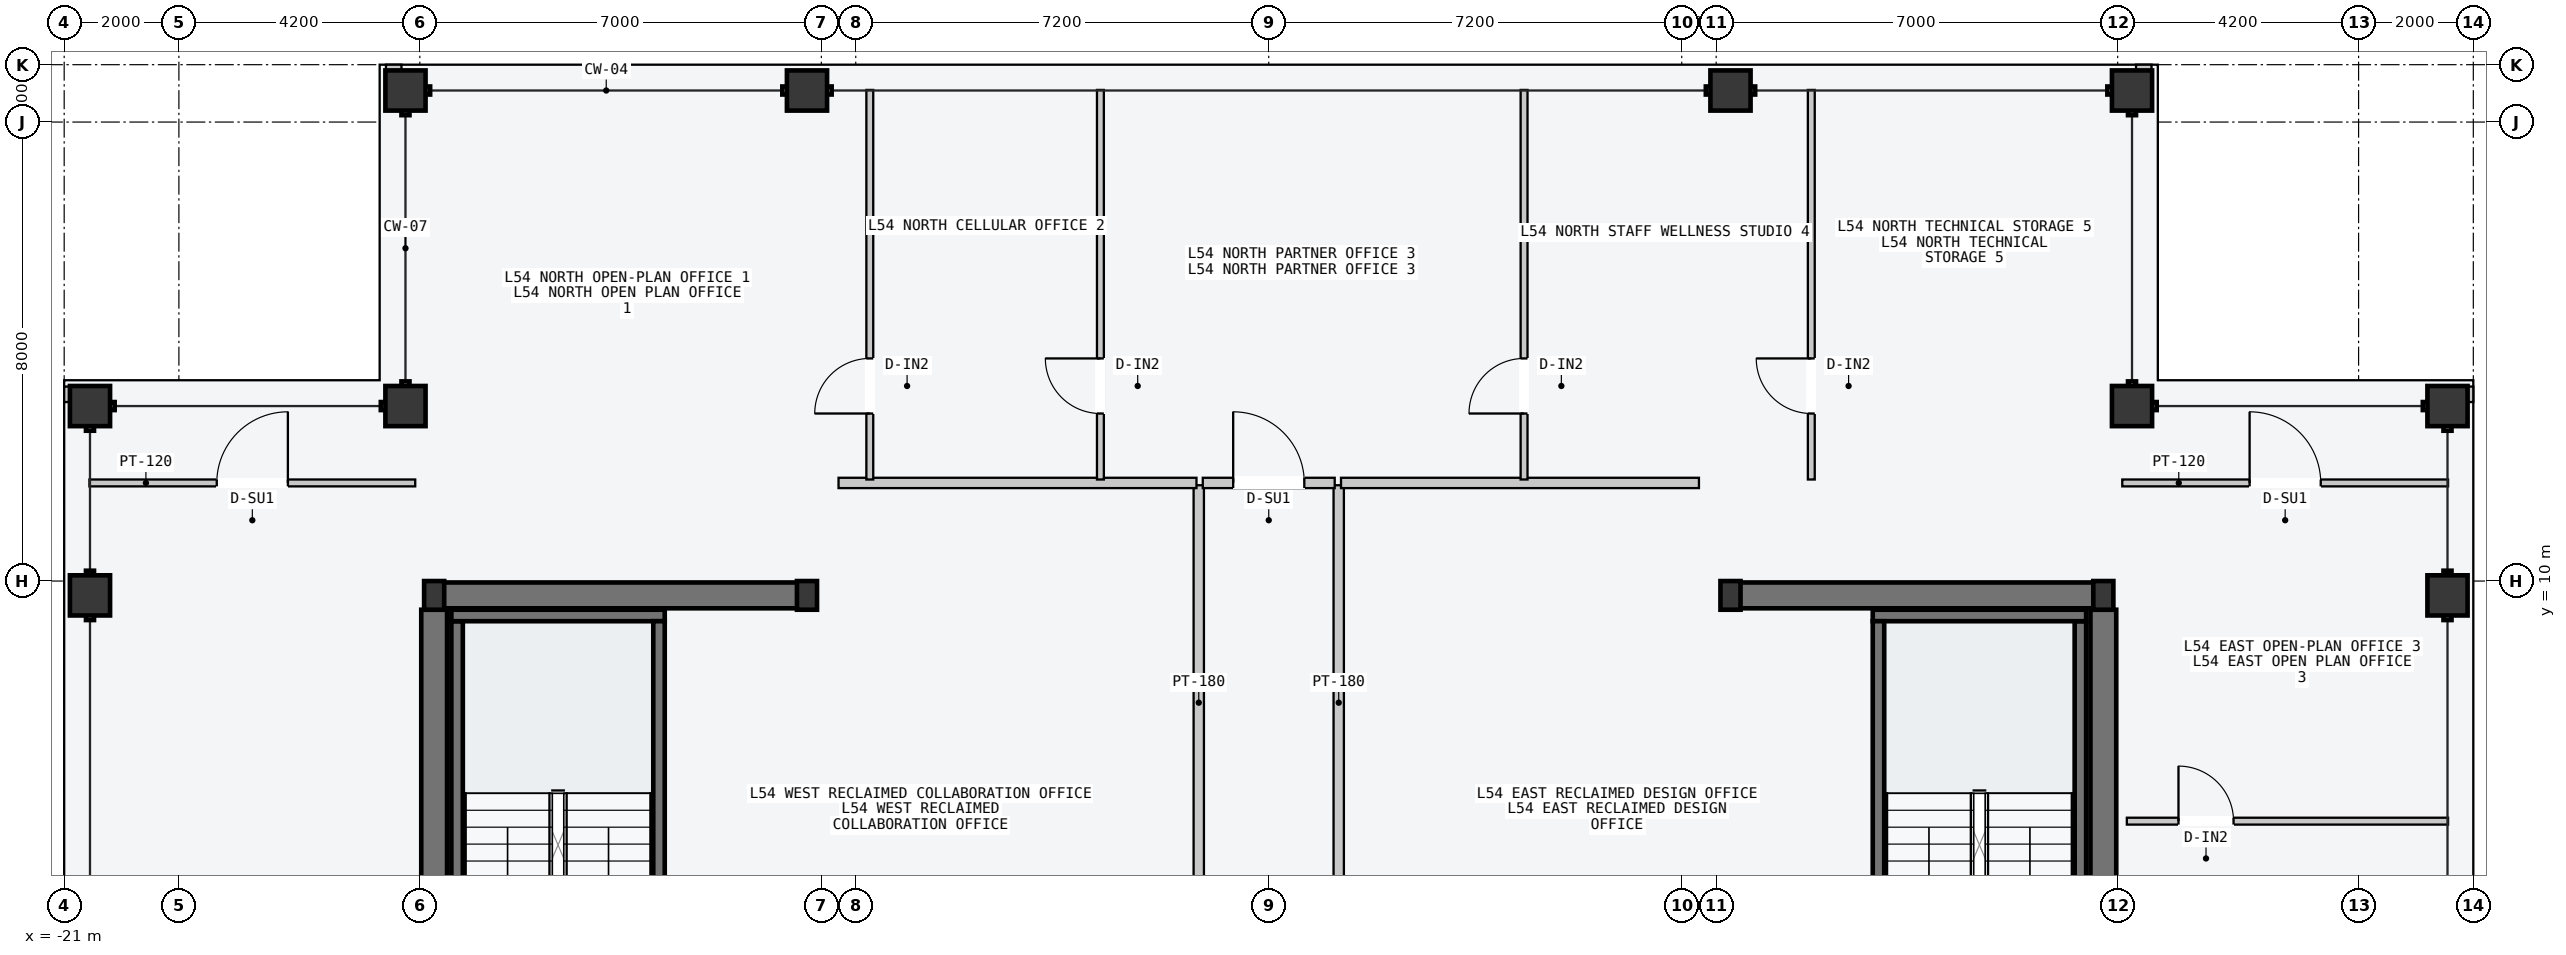
"""IFC4 building model, lengths in metres.
Left out: names, types, materials, properties, quantities, classifications, styles, units other than length and angle.
Written with IfcOpenShell. Run it as: python <this file> out.ifc"""

import sys

from ifc_helpers import new_model, si_unit, direction, frame, frame_2d, origin, origin_2d, place, context, subcontext, project, spatial, rectangle, hollow_rectangle, i_section, extrude, element, fill, save


model = new_model("IFC4")
c1 = context("Model", 3, precision=1e-05, world=origin(), true_north=direction((0.0, 1.0)))
c2 = subcontext(c1, "Body", "Model", "MODEL_VIEW")
j1 = project(units=[si_unit("LENGTHUNIT", "METRE"), si_unit("PLANEANGLEUNIT", "RADIAN")], contexts=[c1])
p1 = place(None, origin())
s1 = spatial("IfcSite", under=j1, at=p1, CompositionType="ELEMENT")
p2 = place(p1, origin())
s2 = spatial("IfcBuilding", under=s1, at=p2, CompositionType="ELEMENT")
p3 = place(p2, frame((0.0, 0.0, 205.5)))
s3 = spatial("IfcBuildingStorey", under=s2, at=p3, CompositionType="ELEMENT", Elevation=205.5)
p4 = place(p3, frame((-14.53, 9.75, -0.2), z_axis=(0.0, 0.0, 1.0), x_axis=(1.0, 0.0, 0.0)))
e1 = element("IfcWall", 1, at=p4, inside=s3, PredefinedType="SHEAR", context=c2, shape_type="SweptSolid", body=[
    extrude(rectangle(XDim=6.46, YDim=0.45, at=frame_2d((3.23, 0.0))), origin(), (0.0, 0.0, 1.0), 3.6),
])
p5 = place(p3, frame((-14.55, 0.25, -0.2), z_axis=(0.0, 0.0, 1.0), x_axis=(0.0, 1.0, 0.0)))
e2 = element("IfcWall", 2, at=p5, inside=s3, PredefinedType="SHEAR", context=c2, shape_type="SweptSolid", body=[
    extrude(rectangle(XDim=9.25, YDim=0.45, at=frame_2d((4.625, 0.0))), origin(), (0.0, 0.0, 1.0), 3.6),
])
p6 = place(p3, frame((8.07, 9.75, -0.2), z_axis=(0.0, 0.0, 1.0), x_axis=(1.0, 0.0, 0.0)))
e3 = element("IfcWall", 3, at=p6, inside=s3, PredefinedType="SHEAR", context=c2, shape_type="SweptSolid", body=[
    extrude(rectangle(XDim=6.46, YDim=0.45, at=frame_2d((3.23, 0.0))), origin(), (0.0, 0.0, 1.0), 3.6),
])
p7 = place(p3, frame((14.55, 0.25, -0.2), z_axis=(0.0, 0.0, 1.0), x_axis=(0.0, 1.0, 0.0)))
e4 = element("IfcWall", 4, at=p7, inside=s3, PredefinedType="SHEAR", context=c2, shape_type="SweptSolid", body=[
    extrude(rectangle(XDim=9.25, YDim=0.45, at=frame_2d((4.625, 0.0))), origin(), (0.0, 0.0, 1.0), 3.6),
])
for number, where, z_axis, x_axis in (
    (5, (-14.15, 1.5, -0.2), (0.0, 0.0, 1.0), (0.0, 1.0, 0.0)),
    (6, (14.15, 1.5, -0.2), (0.0, 0.0, 1.0), (0.0, 1.0, 0.0)),
):
    element("IfcWall", number, at=place(p3, frame(where, z_axis=z_axis, x_axis=x_axis)), inside=s3, PredefinedType="SOLIDWALL", context=c2, shape_type="SweptSolid", body=[
        extrude(rectangle(XDim=7.8, YDim=0.2, at=frame_2d((3.9, 0.0))), origin(), (0.0, 0.0, 1.0), 3.6),
    ])
p8 = place(p3, frame((-14.25, 9.4, -0.2), z_axis=(0.0, 0.0, 1.0), x_axis=(1.0, 0.0, 0.0)))
e7 = element("IfcWall", 7, at=p8, inside=s3, PredefinedType="SOLIDWALL", context=c2, shape_type="SweptSolid", body=[
    extrude(rectangle(XDim=3.72, YDim=0.2, at=frame_2d((1.86, 0.0))), origin(), (0.0, 0.0, 1.0), 3.6),
])
p9 = place(p3, frame((-10.63, 1.5, -0.2), z_axis=(0.0, 0.0, 1.0), x_axis=(0.0, 1.0, 0.0)))
e8 = element("IfcWall", 8, at=p9, inside=s3, PredefinedType="SOLIDWALL", context=c2, shape_type="SweptSolid", body=[
    extrude(rectangle(XDim=7.8, YDim=0.2, at=frame_2d((3.9, 0.0))), origin(), (0.0, 0.0, 1.0), 3.6),
])
p10 = place(p3, frame((10.53, 9.4, -0.2), z_axis=(0.0, 0.0, 1.0), x_axis=(1.0, 0.0, 0.0)))
e9 = element("IfcWall", 9, at=p10, inside=s3, PredefinedType="SOLIDWALL", context=c2, shape_type="SweptSolid", body=[
    extrude(rectangle(XDim=3.72, YDim=0.2, at=frame_2d((1.86, 0.0))), origin(), (0.0, 0.0, 1.0), 3.6),
])
p11 = place(p3, frame((10.63, 1.5, -0.2), z_axis=(0.0, 0.0, 1.0), x_axis=(0.0, 1.0, 0.0)))
e10 = element("IfcWall", 10, at=p11, inside=s3, PredefinedType="SOLIDWALL", context=c2, shape_type="SweptSolid", body=[
    extrude(rectangle(XDim=7.8, YDim=0.2, at=frame_2d((3.9, 0.0))), origin(), (0.0, 0.0, 1.0), 3.6),
])
for number, where, z_axis, x_axis in (
    (11, (-14.55, 9.75, 0.0), (0.0, 0.0, 1.0), (1.0, 0.0, 0.0)),
    (12, (-8.05, 9.75, 0.0), (0.0, 0.0, 1.0), (1.0, 0.0, 0.0)),
    (13, (8.05, 9.75, 0.0), (0.0, 0.0, 1.0), (1.0, 0.0, 0.0)),
    (14, (14.55, 9.75, 0.0), (0.0, 0.0, 1.0), (1.0, 0.0, 0.0)),
):
    element("IfcColumn", number, at=place(p3, frame(where, z_axis=z_axis, x_axis=x_axis)), inside=s3, PredefinedType="COLUMN", context=c2, shape_type="SweptSolid", body=[
        extrude(i_section(OverallWidth=0.35, OverallDepth=0.5, WebThickness=0.02, FlangeThickness=0.032, at=origin_2d()), origin(), (0.0, 0.0, 1.0), 3.6),
    ])
for number, where, z_axis, x_axis in (
    (15, (-15.05, 18.55, 0.0), (0.0, 0.0, 1.0), (1.0, 0.0, 0.0)),
    (16, (-8.05, 18.55, 0.0), (0.0, 0.0, 1.0), (1.0, 0.0, 0.0)),
    (17, (8.05, 18.55, 0.0), (0.0, 0.0, 1.0), (1.0, 0.0, 0.0)),
    (18, (15.05, 18.55, 0.0), (0.0, 0.0, 1.0), (1.0, 0.0, 0.0)),
    (19, (-20.55, 9.75, 0.0), (0.0, 0.0, 1.0), (0.0, 1.0, 0.0)),
    (20, (-20.55, 13.05, 0.0), (0.0, 0.0, 1.0), (0.0, 1.0, 0.0)),
    (21, (20.55, 9.75, 0.0), (0.0, 0.0, 1.0), (0.0, 1.0, 0.0)),
    (22, (20.55, 13.05, 0.0), (0.0, 0.0, 1.0), (0.0, 1.0, 0.0)),
    (23, (-15.05, 13.05, 0.0), (0.0, 0.0, 1.0), (1.0, 0.0, 0.0)),
    (24, (15.05, 13.05, 0.0), (0.0, 0.0, 1.0), (1.0, 0.0, 0.0)),
):
    element("IfcColumn", number, at=place(p3, frame(where, z_axis=z_axis, x_axis=x_axis)), inside=s3, PredefinedType="COLUMN", context=c2, shape_type="SweptSolid", body=[
        extrude(hollow_rectangle(XDim=0.7, YDim=0.7, WallThickness=0.03, at=origin_2d()), origin(), (0.0, 0.0, 1.0), 3.6),
    ])
for number, where, z_axis, x_axis in (
    (25, (-15.39, 18.89, 0.0), (0.0, 0.0, 1.0), (1.0, 0.0, 0.0)),
    (26, (-20.89, 13.12, 0.0), (0.0, 0.0, 1.0), (0.0, 1.0, 0.0)),
    (27, (15.12, 18.89, 0.0), (0.0, 0.0, 1.0), (1.0, 0.0, 0.0)),
    (28, (20.89, 13.12, 0.0), (0.0, 0.0, 1.0), (0.0, 1.0, 0.0)),
):
    element("IfcWall", number, at=place(p3, frame(where, z_axis=z_axis, x_axis=x_axis)), inside=s3, PredefinedType="PARAPET", context=c2, shape_type="SweptSolid", body=[
        extrude(rectangle(XDim=0.27, YDim=0.22, at=frame_2d((0.135, 0.0))), origin(), (0.0, 0.0, 1.0), 1.2),
    ])
p12 = place(p3, frame((-1.22, -3.5, 0.0), z_axis=(0.0, 0.0, 1.0), x_axis=(0.0, 1.0, 0.0)))
e29 = element("IfcWall", 29, at=p12, inside=s3, PredefinedType="PARTITIONING", context=c2, shape_type="SweptSolid", body=[
    extrude(rectangle(XDim=15.17, YDim=0.18, at=frame_2d((7.585, 0.0))), origin(), (0.0, 0.0, 1.0), 3.4),
])
p13 = place(p12, frame((6.1, 0.0, 0.0)))
e30 = element("IfcOpeningElement", 30, at=p13, cuts=e29, PredefinedType="OPENING", context=c2, shape_type="SweptSolid", body=[
    extrude(rectangle(XDim=1.24, YDim=2.24, at=frame_2d((0.62, 1.12))), frame((0.0, 0.1, 0.0), z_axis=(0.0, -1.0, 0.0), x_axis=(1.0, 0.0, 0.0)), (0.0, 0.0, 1.0), 0.2),
])
p14 = place(p12, frame((1.6, 0.0, 0.0)))
e31 = element("IfcOpeningElement", 31, at=p14, cuts=e29, PredefinedType="OPENING", context=c2, shape_type="SweptSolid", body=[
    extrude(rectangle(XDim=0.96, YDim=2.18, at=frame_2d((0.48, 1.09))), frame((0.0, 0.1, 0.0), z_axis=(0.0, -1.0, 0.0), x_axis=(1.0, 0.0, 0.0)), (0.0, 0.0, 1.0), 0.2),
])
p15 = place(p3, frame((-7.5, 11.71, 0.0), z_axis=(0.0, 0.0, 1.0), x_axis=(1.0, 0.0, 0.0)))
e32 = element("IfcWall", 32, at=p15, inside=s3, PredefinedType="PARTITIONING", context=c2, shape_type="SweptSolid", body=[
    extrude(rectangle(XDim=6.24, YDim=0.18, at=frame_2d((3.12, 0.0))), origin(), (0.0, 0.0, 1.0), 3.4),
])
p16 = place(p3, frame((1.22, -3.5, 0.0), z_axis=(0.0, 0.0, 1.0), x_axis=(0.0, 1.0, 0.0)))
e33 = element("IfcWall", 33, at=p16, inside=s3, PredefinedType="PARTITIONING", context=c2, shape_type="SweptSolid", body=[
    extrude(rectangle(XDim=15.17, YDim=0.18, at=frame_2d((7.585, 0.0))), origin(), (0.0, 0.0, 1.0), 3.4),
])
p17 = place(p16, frame((6.1, 0.0, 0.0)))
e34 = element("IfcOpeningElement", 34, at=p17, cuts=e33, PredefinedType="OPENING", context=c2, shape_type="SweptSolid", body=[
    extrude(rectangle(XDim=1.24, YDim=2.24, at=frame_2d((0.62, 1.12))), frame((0.0, 0.1, 0.0), z_axis=(0.0, -1.0, 0.0), x_axis=(1.0, 0.0, 0.0)), (0.0, 0.0, 1.0), 0.2),
])
p18 = place(p16, frame((1.6, 0.0, 0.0)))
e35 = element("IfcOpeningElement", 35, at=p18, cuts=e33, PredefinedType="OPENING", context=c2, shape_type="SweptSolid", body=[
    extrude(rectangle(XDim=0.96, YDim=2.18, at=frame_2d((0.48, 1.09))), frame((0.0, 0.1, 0.0), z_axis=(0.0, -1.0, 0.0), x_axis=(1.0, 0.0, 0.0)), (0.0, 0.0, 1.0), 0.2),
])
p19 = place(p3, frame((1.26, 11.71, 0.0), z_axis=(0.0, 0.0, 1.0), x_axis=(1.0, 0.0, 0.0)))
e36 = element("IfcWall", 36, at=p19, inside=s3, PredefinedType="PARTITIONING", context=c2, shape_type="SweptSolid", body=[
    extrude(rectangle(XDim=6.24, YDim=0.18, at=frame_2d((3.12, 0.0))), origin(), (0.0, 0.0, 1.0), 3.4),
])
p20 = place(p3, frame((-6.955, 11.77, 0.0), z_axis=(0.0, 0.0, 1.0), x_axis=(0.0, 1.0, 0.0)))
e37 = element("IfcWall", 37, at=p20, inside=s3, PredefinedType="PARTITIONING", context=c2, shape_type="SweptSolid", body=[
    extrude(rectangle(XDim=6.79, YDim=0.12, at=frame_2d((3.395, 0.0))), origin(), (0.0, 0.0, 1.0), 3.4),
])
p21 = place(p20, frame((1.15, 0.0, 0.0)))
e38 = element("IfcOpeningElement", 38, at=p21, cuts=e37, PredefinedType="OPENING", context=c2, shape_type="SweptSolid", body=[
    extrude(rectangle(XDim=0.96, YDim=2.18, at=frame_2d((0.48, 1.09))), frame((0.0, 0.07, 0.0), z_axis=(0.0, -1.0, 0.0), x_axis=(1.0, 0.0, 0.0)), (0.0, 0.0, 1.0), 0.14),
])
p22 = place(p3, frame((-2.935, 11.77, 0.0), z_axis=(0.0, 0.0, 1.0), x_axis=(0.0, 1.0, 0.0)))
e39 = element("IfcWall", 39, at=p22, inside=s3, PredefinedType="PARTITIONING", context=c2, shape_type="SweptSolid", body=[
    extrude(rectangle(XDim=6.79, YDim=0.12, at=frame_2d((3.395, 0.0))), origin(), (0.0, 0.0, 1.0), 3.4),
])
p23 = place(p22, frame((1.15, 0.0, 0.0)))
e40 = element("IfcOpeningElement", 40, at=p23, cuts=e39, PredefinedType="OPENING", context=c2, shape_type="SweptSolid", body=[
    extrude(rectangle(XDim=0.96, YDim=2.18, at=frame_2d((0.48, 1.09))), frame((0.0, 0.07, 0.0), z_axis=(0.0, -1.0, 0.0), x_axis=(1.0, 0.0, 0.0)), (0.0, 0.0, 1.0), 0.14),
])
p24 = place(p3, frame((4.451, 11.77, 0.0), z_axis=(0.0, 0.0, 1.0), x_axis=(0.0, 1.0, 0.0)))
e41 = element("IfcWall", 41, at=p24, inside=s3, PredefinedType="PARTITIONING", context=c2, shape_type="SweptSolid", body=[
    extrude(rectangle(XDim=6.79, YDim=0.12, at=frame_2d((3.395, 0.0))), origin(), (0.0, 0.0, 1.0), 3.4),
])
p25 = place(p24, frame((1.15, 0.0, 0.0)))
e42 = element("IfcOpeningElement", 42, at=p25, cuts=e41, PredefinedType="OPENING", context=c2, shape_type="SweptSolid", body=[
    extrude(rectangle(XDim=0.96, YDim=2.18, at=frame_2d((0.48, 1.09))), frame((0.0, 0.07, 0.0), z_axis=(0.0, -1.0, 0.0), x_axis=(1.0, 0.0, 0.0)), (0.0, 0.0, 1.0), 0.14),
])
p26 = place(p3, frame((9.459, 11.77, 0.0), z_axis=(0.0, 0.0, 1.0), x_axis=(0.0, 1.0, 0.0)))
e43 = element("IfcWall", 43, at=p26, inside=s3, PredefinedType="PARTITIONING", context=c2, shape_type="SweptSolid", body=[
    extrude(rectangle(XDim=6.79, YDim=0.12, at=frame_2d((3.395, 0.0))), origin(), (0.0, 0.0, 1.0), 3.4),
])
p27 = place(p26, frame((1.15, 0.0, 0.0)))
e44 = element("IfcOpeningElement", 44, at=p27, cuts=e43, PredefinedType="OPENING", context=c2, shape_type="SweptSolid", body=[
    extrude(rectangle(XDim=0.96, YDim=2.18, at=frame_2d((0.48, 1.09))), frame((0.0, 0.07, 0.0), z_axis=(0.0, -1.0, 0.0), x_axis=(1.0, 0.0, 0.0)), (0.0, 0.0, 1.0), 0.14),
])
p28 = place(p3, frame((-1.15, 11.71, 0.0), z_axis=(0.0, 0.0, 1.0), x_axis=(1.0, 0.0, 0.0)))
e45 = element("IfcWall", 45, at=p28, inside=s3, PredefinedType="PARTITIONING", context=c2, shape_type="SweptSolid", body=[
    extrude(rectangle(XDim=2.3, YDim=0.18, at=frame_2d((1.15, 0.0))), origin(), (0.0, 0.0, 1.0), 3.4),
])
p29 = place(p28, frame((0.53, 0.0, 0.0)))
e46 = element("IfcOpeningElement", 46, at=p29, cuts=e45, PredefinedType="OPENING", context=c2, shape_type="SweptSolid", body=[
    extrude(rectangle(XDim=1.24, YDim=2.24, at=frame_2d((0.62, 1.12))), frame((0.0, 0.1, 0.0), z_axis=(0.0, -1.0, 0.0), x_axis=(1.0, 0.0, 0.0)), (0.0, 0.0, 1.0), 0.2),
])
p30 = place(p3, frame((-20.56, 11.71, 0.0), z_axis=(0.0, 0.0, 1.0), x_axis=(1.0, 0.0, 0.0)))
e47 = element("IfcWall", 47, at=p30, inside=s3, PredefinedType="PARTITIONING", context=c2, shape_type="SweptSolid", body=[
    extrude(rectangle(XDim=5.68, YDim=0.12, at=frame_2d((2.84, 0.0))), origin(), (0.0, 0.0, 1.0), 3.4),
])
p31 = place(p30, frame((2.22, 0.0, 0.0)))
e48 = element("IfcOpeningElement", 48, at=p31, cuts=e47, PredefinedType="OPENING", context=c2, shape_type="SweptSolid", body=[
    extrude(rectangle(XDim=1.24, YDim=2.24, at=frame_2d((0.62, 1.12))), frame((0.0, 0.07, 0.0), z_axis=(0.0, -1.0, 0.0), x_axis=(1.0, 0.0, 0.0)), (0.0, 0.0, 1.0), 0.14),
])
p32 = place(p3, frame((14.88, 11.71, 0.0), z_axis=(0.0, 0.0, 1.0), x_axis=(1.0, 0.0, 0.0)))
e49 = element("IfcWall", 49, at=p32, inside=s3, PredefinedType="PARTITIONING", context=c2, shape_type="SweptSolid", body=[
    extrude(rectangle(XDim=5.68, YDim=0.12, at=frame_2d((2.84, 0.0))), origin(), (0.0, 0.0, 1.0), 3.4),
])
p33 = place(p32, frame((2.22, 0.0, 0.0)))
e50 = element("IfcOpeningElement", 50, at=p33, cuts=e49, PredefinedType="OPENING", context=c2, shape_type="SweptSolid", body=[
    extrude(rectangle(XDim=1.24, YDim=2.24, at=frame_2d((0.62, 1.12))), frame((0.0, 0.07, 0.0), z_axis=(0.0, -1.0, 0.0), x_axis=(1.0, 0.0, 0.0)), (0.0, 0.0, 1.0), 0.14),
])
p34 = place(p3, frame((14.96, 5.815, 0.0), z_axis=(0.0, 0.0, 1.0), x_axis=(1.0, 0.0, 0.0)))
e51 = element("IfcWall", 51, at=p34, inside=s3, PredefinedType="PARTITIONING", context=c2, shape_type="SweptSolid", body=[
    extrude(rectangle(XDim=5.6, YDim=0.12, at=frame_2d((2.8, 0.0))), origin(), (0.0, 0.0, 1.0), 3.4),
])
p35 = place(p34, frame((0.9, 0.0, 0.0)))
e52 = element("IfcOpeningElement", 52, at=p35, cuts=e51, PredefinedType="OPENING", context=c2, shape_type="SweptSolid", body=[
    extrude(rectangle(XDim=0.96, YDim=2.18, at=frame_2d((0.48, 1.09))), frame((0.0, 0.07, 0.0), z_axis=(0.0, -1.0, 0.0), x_axis=(1.0, 0.0, 0.0)), (0.0, 0.0, 1.0), 0.14),
])
p36 = place(p21, origin())
e53 = element("IfcDoor", 53, at=p36, inside=s3, OperationType="SINGLE_SWING_LEFT", PredefinedType="DOOR", context=c2, shape_type="SweptSolid", body=[
    extrude(rectangle(XDim=0.96, YDim=2.18, at=frame_2d((0.48, 1.09))), frame((0.0, 0.025, 0.0), z_axis=(0.0, -1.0, 0.0), x_axis=(1.0, 0.0, 0.0)), (0.0, 0.0, 1.0), 0.05),
])
fill(e38, e53)
p37 = place(p23, origin())
e54 = element("IfcDoor", 54, at=p37, inside=s3, OperationType="SINGLE_SWING_RIGHT", PredefinedType="DOOR", context=c2, shape_type="SweptSolid", body=[
    extrude(rectangle(XDim=0.96, YDim=2.18, at=frame_2d((0.48, 1.09))), frame((0.0, 0.025, 0.0), z_axis=(0.0, -1.0, 0.0), x_axis=(1.0, 0.0, 0.0)), (0.0, 0.0, 1.0), 0.05),
])
fill(e40, e54)
p38 = place(p25, origin())
e55 = element("IfcDoor", 55, at=p38, inside=s3, OperationType="SINGLE_SWING_LEFT", PredefinedType="DOOR", context=c2, shape_type="SweptSolid", body=[
    extrude(rectangle(XDim=0.96, YDim=2.18, at=frame_2d((0.48, 1.09))), frame((0.0, 0.025, 0.0), z_axis=(0.0, -1.0, 0.0), x_axis=(1.0, 0.0, 0.0)), (0.0, 0.0, 1.0), 0.05),
])
fill(e42, e55)
p39 = place(p27, origin())
e56 = element("IfcDoor", 56, at=p39, inside=s3, OperationType="SINGLE_SWING_RIGHT", PredefinedType="DOOR", context=c2, shape_type="SweptSolid", body=[
    extrude(rectangle(XDim=0.96, YDim=2.18, at=frame_2d((0.48, 1.09))), frame((0.0, 0.025, 0.0), z_axis=(0.0, -1.0, 0.0), x_axis=(1.0, 0.0, 0.0)), (0.0, 0.0, 1.0), 0.05),
])
fill(e44, e56)
p40 = place(p29, origin())
e57 = element("IfcDoor", 57, at=p40, inside=s3, OperationType="SINGLE_SWING_LEFT", PredefinedType="DOOR", context=c2, shape_type="SweptSolid", body=[
    extrude(rectangle(XDim=1.24, YDim=2.24, at=frame_2d((0.62, 1.12))), frame((0.0, 0.025, 0.0), z_axis=(0.0, -1.0, 0.0), x_axis=(1.0, 0.0, 0.0)), (0.0, 0.0, 1.0), 0.05),
])
fill(e46, e57)
p41 = place(p31, origin())
e58 = element("IfcDoor", 58, at=p41, inside=s3, OperationType="SINGLE_SWING_RIGHT", PredefinedType="DOOR", context=c2, shape_type="SweptSolid", body=[
    extrude(rectangle(XDim=1.24, YDim=2.24, at=frame_2d((0.62, 1.12))), frame((0.0, 0.025, 0.0), z_axis=(0.0, -1.0, 0.0), x_axis=(1.0, 0.0, 0.0)), (0.0, 0.0, 1.0), 0.05),
])
fill(e48, e58)
p42 = place(p33, origin())
e59 = element("IfcDoor", 59, at=p42, inside=s3, OperationType="SINGLE_SWING_LEFT", PredefinedType="DOOR", context=c2, shape_type="SweptSolid", body=[
    extrude(rectangle(XDim=1.24, YDim=2.24, at=frame_2d((0.62, 1.12))), frame((0.0, 0.025, 0.0), z_axis=(0.0, -1.0, 0.0), x_axis=(1.0, 0.0, 0.0)), (0.0, 0.0, 1.0), 0.05),
])
fill(e50, e59)
p43 = place(p35, origin())
e60 = element("IfcDoor", 60, at=p43, inside=s3, OperationType="SINGLE_SWING_LEFT", PredefinedType="DOOR", context=c2, shape_type="SweptSolid", body=[
    extrude(rectangle(XDim=0.96, YDim=2.18, at=frame_2d((0.48, 1.09))), frame((0.0, 0.025, 0.0), z_axis=(0.0, -1.0, 0.0), x_axis=(1.0, 0.0, 0.0)), (0.0, 0.0, 1.0), 0.05),
])
fill(e52, e60)
save(model, sys.argv[1])
